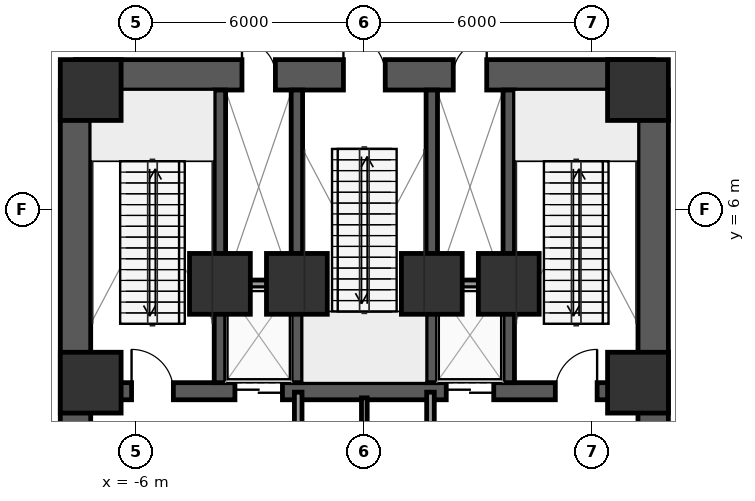
"""IFC4 building model, lengths in metres.
Left out: names, types, materials, properties, quantities, classifications, styles, units other than length and angle.
Written with IfcOpenShell. Run it as: python <this file> out.ifc"""

import sys

from ifc_helpers import new_model, si_unit, direction, frame, frame_2d, origin, origin_2d, place, context, subcontext, project, spatial, rectangle, extrude, element, fill, save


model = new_model("IFC4")
c1 = context("Model", 3, precision=1e-05, world=origin(), true_north=direction((0.0, 1.0)))
c2 = subcontext(c1, "Body", "Model", "MODEL_VIEW")
j1 = project(units=[si_unit("LENGTHUNIT", "METRE"), si_unit("PLANEANGLEUNIT", "RADIAN")], contexts=[c1])
p1 = place(None, origin())
s1 = spatial("IfcSite", under=j1, at=p1, CompositionType="ELEMENT")
p2 = place(p1, origin())
s2 = spatial("IfcBuilding", under=s1, at=p2, CompositionType="ELEMENT")
p3 = place(p2, frame((0.0, 0.0, 23.5)))
s3 = spatial("IfcBuildingStorey", under=s2, at=p3, CompositionType="ELEMENT", Elevation=23.5)
p4 = place(p3, frame((-7.6, 9.55, 0.0), z_axis=(0.0, 0.0, 1.0), x_axis=(1.0, 0.0, 0.0)))
e1 = element("IfcWall", 1, at=p4, inside=s3, PredefinedType="SHEAR", context=c2, shape_type="SweptSolid", body=[
    extrude(rectangle(XDim=15.2, YDim=0.8, at=frame_2d((7.6, 0.0))), origin(), (0.0, 0.0, 1.0), 5.15),
])
p5 = place(p4, frame((7.05, 0.0, 0.0)))
e2 = element("IfcOpeningElement", 2, at=p5, cuts=e1, PredefinedType="OPENING", context=c2, shape_type="SweptSolid", body=[
    extrude(rectangle(XDim=1.1, YDim=2.15, at=frame_2d((0.55, 1.075))), frame((0.0, 0.41, 0.0), z_axis=(0.0, -1.0, 0.0), x_axis=(1.0, 0.0, 0.0)), (0.0, 0.0, 1.0), 0.82),
])
p6 = place(p4, frame((4.38, 0.0, 0.0)))
e3 = element("IfcOpeningElement", 3, at=p6, cuts=e1, PredefinedType="OPENING", context=c2, shape_type="SweptSolid", body=[
    extrude(rectangle(XDim=0.88, YDim=2.15, at=frame_2d((0.44, 1.075))), frame((0.0, 0.41, 0.0), z_axis=(0.0, -1.0, 0.0), x_axis=(1.0, 0.0, 0.0)), (0.0, 0.0, 1.0), 0.82),
])
p7 = place(p4, frame((9.94, 0.0, 0.0)))
e4 = element("IfcOpeningElement", 4, at=p7, cuts=e1, PredefinedType="OPENING", context=c2, shape_type="SweptSolid", body=[
    extrude(rectangle(XDim=0.88, YDim=2.15, at=frame_2d((0.44, 1.075))), frame((0.0, 0.41, 0.0), z_axis=(0.0, -1.0, 0.0), x_axis=(1.0, 0.0, 0.0)), (0.0, 0.0, 1.0), 0.82),
])
p8 = place(p3, frame((-7.2, 1.225, 0.0), z_axis=(0.0, 0.0, 1.0), x_axis=(1.0, 0.0, 0.0)))
e5 = element("IfcWall", 5, at=p8, inside=s3, PredefinedType="SHEAR", context=c2, shape_type="SweptSolid", body=[
    extrude(rectangle(XDim=14.4, YDim=0.45, at=frame_2d((7.2, 0.0))), origin(), (0.0, 0.0, 1.0), 5.15),
])
p9 = place(p8, frame((3.795, 0.0, 0.0)))
e6 = element("IfcOpeningElement", 6, at=p9, cuts=e5, PredefinedType="OPENING", context=c2, shape_type="SweptSolid", body=[
    extrude(rectangle(XDim=1.25, YDim=2.25, at=frame_2d((0.625, 1.125))), frame((0.0, 0.235, 0.0), z_axis=(0.0, -1.0, 0.0), x_axis=(1.0, 0.0, 0.0)), (0.0, 0.0, 1.0), 0.47),
])
p10 = place(p8, frame((9.355, 0.0, 0.0)))
e7 = element("IfcOpeningElement", 7, at=p10, cuts=e5, PredefinedType="OPENING", context=c2, shape_type="SweptSolid", body=[
    extrude(rectangle(XDim=1.25, YDim=2.25, at=frame_2d((0.625, 1.125))), frame((0.0, 0.235, 0.0), z_axis=(0.0, -1.0, 0.0), x_axis=(1.0, 0.0, 0.0)), (0.0, 0.0, 1.0), 0.47),
])
p11 = place(p8, frame((1.075, 0.0, 0.0)))
e8 = element("IfcOpeningElement", 8, at=p11, cuts=e5, PredefinedType="OPENING", context=c2, shape_type="SweptSolid", body=[
    extrude(rectangle(XDim=1.1, YDim=2.15, at=frame_2d((0.55, 1.075))), frame((0.0, 0.235, 0.0), z_axis=(0.0, -1.0, 0.0), x_axis=(1.0, 0.0, 0.0)), (0.0, 0.0, 1.0), 0.47),
])
p12 = place(p8, frame((12.225, 0.0, 0.0)))
e9 = element("IfcOpeningElement", 9, at=p12, cuts=e5, PredefinedType="OPENING", context=c2, shape_type="SweptSolid", body=[
    extrude(rectangle(XDim=1.1, YDim=2.15, at=frame_2d((0.55, 1.075))), frame((0.0, 0.235, 0.0), z_axis=(0.0, -1.0, 0.0), x_axis=(1.0, 0.0, 0.0)), (0.0, 0.0, 1.0), 0.47),
])
for number, where, z_axis, x_axis in (
    (10, (-3.8, 1.45, 0.0), (0.0, 0.0, 1.0), (0.0, 1.0, 0.0)),
    (11, (-1.775, 1.45, 0.0), (0.0, 0.0, 1.0), (0.0, 1.0, 0.0)),
    (12, (1.775, 1.45, 0.0), (0.0, 0.0, 1.0), (0.0, 1.0, 0.0)),
    (13, (3.8, 1.45, 0.0), (0.0, 0.0, 1.0), (0.0, 1.0, 0.0)),
):
    element("IfcWall", number, at=place(p3, frame(where, z_axis=z_axis, x_axis=x_axis)), inside=s3, PredefinedType="SHEAR", context=c2, shape_type="SweptSolid", body=[
        extrude(rectangle(XDim=7.7, YDim=0.3, at=frame_2d((3.85, 0.0))), origin(), (0.0, 0.0, 1.0), 5.15),
    ])
for number, where, z_axis, x_axis in (
    (14, (-7.6, 0.1, 0.0), (0.0, 0.0, 1.0), (0.0, 1.0, 0.0)),
    (15, (7.6, 0.1, 0.0), (0.0, 0.0, 1.0), (0.0, 1.0, 0.0)),
):
    element("IfcWall", number, at=place(p3, frame(where, z_axis=z_axis, x_axis=x_axis)), inside=s3, PredefinedType="SHEAR", context=c2, shape_type="SweptSolid", body=[
        extrude(rectangle(XDim=9.05, YDim=0.8, at=frame_2d((4.525, 0.0))), origin(), (0.0, 0.0, 1.0), 5.15),
    ])
for number, where, z_axis, x_axis in (
    (16, (7.2, 1.45, 0.0), (0.0, 0.0, 1.0), (1.0, 0.0, 0.0)),
    (17, (7.2, 9.15, 0.0), (0.0, 0.0, 1.0), (1.0, 0.0, 0.0)),
    (18, (-7.2, 9.15, 0.0), (0.0, 0.0, 1.0), (1.0, 0.0, 0.0)),
    (19, (-7.2, 1.45, 0.0), (0.0, 0.0, 1.0), (1.0, 0.0, 0.0)),
    (20, (-3.8, 4.05, 0.0), (0.0, 0.0, 1.0), (1.0, 0.0, 0.0)),
    (21, (3.8, 4.05, 0.0), (0.0, 0.0, 1.0), (1.0, 0.0, 0.0)),
    (22, (-1.775, 4.05, 0.0), (0.0, 0.0, 1.0), (1.0, 0.0, 0.0)),
    (23, (1.775, 4.05, 0.0), (0.0, 0.0, 1.0), (1.0, 0.0, 0.0)),
):
    element("IfcColumn", number, at=place(p3, frame(where, z_axis=z_axis, x_axis=x_axis)), inside=s3, PredefinedType="COLUMN", context=c2, shape_type="SweptSolid", body=[
        extrude(rectangle(XDim=1.6, YDim=1.6, at=origin_2d()), origin(), (0.0, 0.0, 1.0), 5.5),
    ])
for number, where, z_axis, x_axis in (
    (24, (-3.65, 4.05, 0.0), (0.0, 0.0, 1.0), (1.0, 0.0, 0.0)),
    (25, (1.92, 4.05, 0.0), (0.0, 0.0, 1.0), (1.0, 0.0, 0.0)),
):
    element("IfcWall", number, at=place(p3, frame(where, z_axis=z_axis, x_axis=x_axis)), inside=s3, PredefinedType="PARTITIONING", context=c2, shape_type="SweptSolid", body=[
        extrude(rectangle(XDim=1.73, YDim=0.2, at=frame_2d((0.865, 0.0))), origin(), (0.0, 0.0, 1.0), 5.15),
    ])
p13 = place(p3, frame((-1.74, -1.78, 0.0), z_axis=(0.0, 0.0, 1.0), x_axis=(0.0, 1.0, 0.0)))
e26 = element("IfcWall", 26, at=p13, inside=s3, PredefinedType="PARTITIONING", context=c2, shape_type="SweptSolid", body=[
    extrude(rectangle(XDim=2.98, YDim=0.2, at=frame_2d((1.49, 0.0))), origin(), (0.0, 0.0, 1.0), 5.15),
])
p14 = place(p13, frame((0.89, 0.0, 0.0)))
e27 = element("IfcOpeningElement", 27, at=p14, cuts=e26, PredefinedType="OPENING", context=c2, shape_type="SweptSolid", body=[
    extrude(rectangle(XDim=0.88, YDim=2.15, at=frame_2d((0.44, 1.075))), frame((0.0, 0.11, 0.0), z_axis=(0.0, -1.0, 0.0), x_axis=(1.0, 0.0, 0.0)), (0.0, 0.0, 1.0), 0.22),
])
p15 = place(p3, frame((1.74, -1.78, 0.0), z_axis=(0.0, 0.0, 1.0), x_axis=(0.0, 1.0, 0.0)))
e28 = element("IfcWall", 28, at=p15, inside=s3, PredefinedType="PARTITIONING", context=c2, shape_type="SweptSolid", body=[
    extrude(rectangle(XDim=2.98, YDim=0.2, at=frame_2d((1.49, 0.0))), origin(), (0.0, 0.0, 1.0), 5.15),
])
p16 = place(p15, frame((0.89, 0.0, 0.0)))
e29 = element("IfcOpeningElement", 29, at=p16, cuts=e28, PredefinedType="OPENING", context=c2, shape_type="SweptSolid", body=[
    extrude(rectangle(XDim=0.88, YDim=2.15, at=frame_2d((0.44, 1.075))), frame((0.0, 0.11, 0.0), z_axis=(0.0, -1.0, 0.0), x_axis=(1.0, 0.0, 0.0)), (0.0, 0.0, 1.0), 0.22),
])
p17 = place(p3, frame((0.0, -1.78, 0.0), z_axis=(0.0, 0.0, 1.0), x_axis=(0.0, 1.0, 0.0)))
e30 = element("IfcWall", 30, at=p17, inside=s3, PredefinedType="PARTITIONING", context=c2, shape_type="SweptSolid", body=[
    extrude(rectangle(XDim=2.83, YDim=0.15, at=frame_2d((1.415, 0.0))), origin(), (0.0, 0.0, 1.0), 5.15),
])
p18 = place(p9, origin())
e31 = element("IfcDoor", 31, at=p18, inside=s3, OperationType="DOUBLE_DOOR_SLIDING", PredefinedType="DOOR", context=c2, shape_type="SweptSolid", body=[
    extrude(rectangle(XDim=1.25, YDim=2.25, at=frame_2d((0.625, 1.125))), frame((0.0, 0.025, 0.0), z_axis=(0.0, -1.0, 0.0), x_axis=(1.0, 0.0, 0.0)), (0.0, 0.0, 1.0), 0.05),
])
fill(e6, e31)
p19 = place(p10, origin())
e32 = element("IfcDoor", 32, at=p19, inside=s3, OperationType="DOUBLE_DOOR_SLIDING", PredefinedType="DOOR", context=c2, shape_type="SweptSolid", body=[
    extrude(rectangle(XDim=1.25, YDim=2.25, at=frame_2d((0.625, 1.125))), frame((0.0, 0.025, 0.0), z_axis=(0.0, -1.0, 0.0), x_axis=(1.0, 0.0, 0.0)), (0.0, 0.0, 1.0), 0.05),
])
fill(e7, e32)
p20 = place(p11, origin())
e33 = element("IfcDoor", 33, at=p20, inside=s3, OperationType="SINGLE_SWING_LEFT", PredefinedType="DOOR", context=c2, shape_type="SweptSolid", body=[
    extrude(rectangle(XDim=1.1, YDim=2.15, at=frame_2d((0.55, 1.075))), frame((0.0, 0.025, 0.0), z_axis=(0.0, -1.0, 0.0), x_axis=(1.0, 0.0, 0.0)), (0.0, 0.0, 1.0), 0.05),
])
fill(e8, e33)
p21 = place(p12, origin())
e34 = element("IfcDoor", 34, at=p21, inside=s3, OperationType="SINGLE_SWING_RIGHT", PredefinedType="DOOR", context=c2, shape_type="SweptSolid", body=[
    extrude(rectangle(XDim=1.1, YDim=2.15, at=frame_2d((0.55, 1.075))), frame((0.0, 0.025, 0.0), z_axis=(0.0, -1.0, 0.0), x_axis=(1.0, 0.0, 0.0)), (0.0, 0.0, 1.0), 0.05),
])
fill(e9, e34)
p22 = place(p5, origin())
e35 = element("IfcDoor", 35, at=p22, inside=s3, OperationType="SINGLE_SWING_LEFT", PredefinedType="DOOR", context=c2, shape_type="SweptSolid", body=[
    extrude(rectangle(XDim=1.1, YDim=2.15, at=frame_2d((0.55, 1.075))), frame((0.0, 0.025, 0.0), z_axis=(0.0, -1.0, 0.0), x_axis=(1.0, 0.0, 0.0)), (0.0, 0.0, 1.0), 0.05),
])
fill(e2, e35)
p23 = place(p6, origin())
e36 = element("IfcDoor", 36, at=p23, inside=s3, OperationType="SINGLE_SWING_LEFT", PredefinedType="DOOR", context=c2, shape_type="SweptSolid", body=[
    extrude(rectangle(XDim=0.88, YDim=2.15, at=frame_2d((0.44, 1.075))), frame((0.0, 0.025, 0.0), z_axis=(0.0, -1.0, 0.0), x_axis=(1.0, 0.0, 0.0)), (0.0, 0.0, 1.0), 0.05),
])
fill(e3, e36)
p24 = place(p7, origin())
e37 = element("IfcDoor", 37, at=p24, inside=s3, OperationType="SINGLE_SWING_RIGHT", PredefinedType="DOOR", context=c2, shape_type="SweptSolid", body=[
    extrude(rectangle(XDim=0.88, YDim=2.15, at=frame_2d((0.44, 1.075))), frame((0.0, 0.025, 0.0), z_axis=(0.0, -1.0, 0.0), x_axis=(1.0, 0.0, 0.0)), (0.0, 0.0, 1.0), 0.05),
])
fill(e4, e37)
save(model, sys.argv[1])
